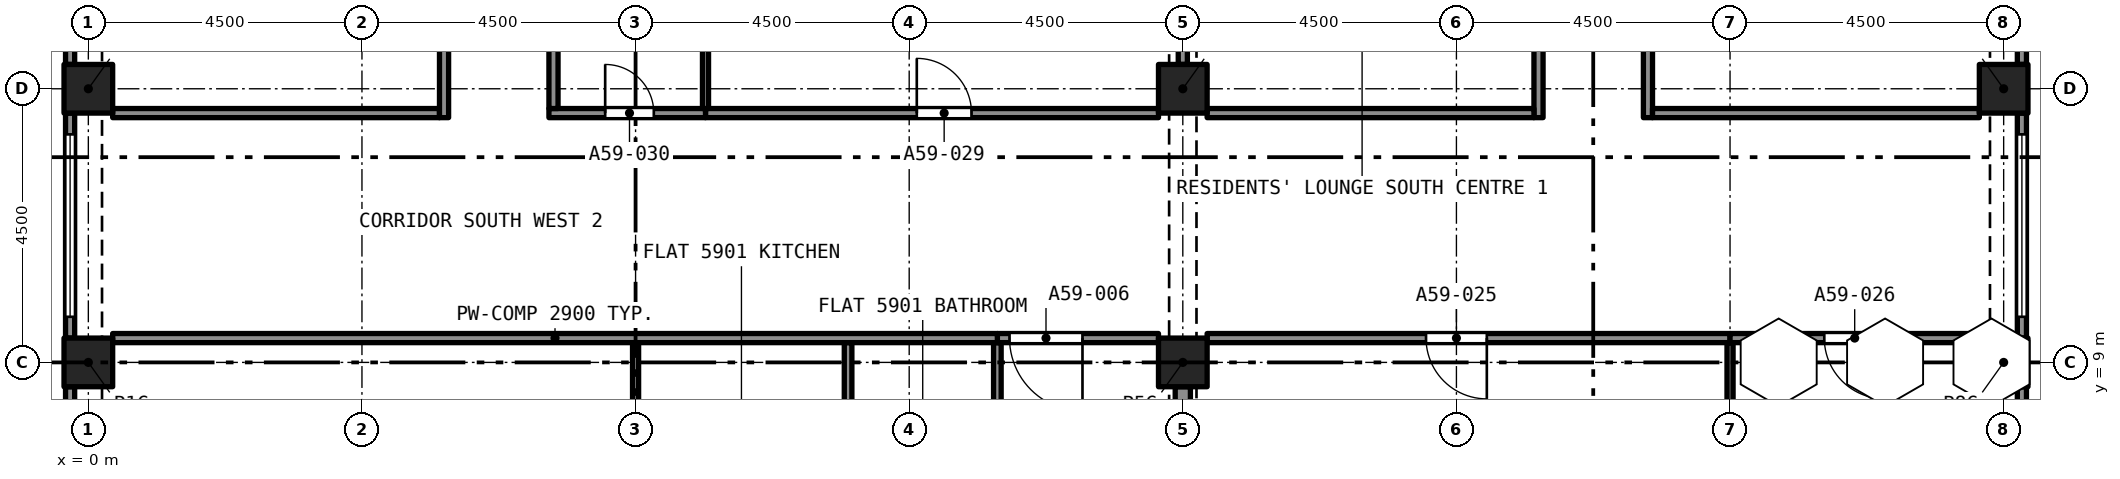
"""IFC4 building model, lengths in metres.
Left out: names, types, materials, properties, quantities, classifications, styles, units other than length and angle.
Written with IfcOpenShell. Run it as: python <this file> out.ifc"""

import sys

from ifc_helpers import new_model, si_unit, direction, frame, frame_2d, origin, origin_2d, place, context, subcontext, project, spatial, rectangle, extrude, element, fill, save


model = new_model("IFC4")
c1 = context("Model", 3, precision=1e-05, world=origin(), true_north=direction((0.0, 1.0)))
c2 = subcontext(c1, "Body", "Model", "MODEL_VIEW")
j1 = project(units=[si_unit("LENGTHUNIT", "METRE"), si_unit("PLANEANGLEUNIT", "RADIAN")], contexts=[c1])
p1 = place(None, origin())
s1 = spatial("IfcSite", under=j1, at=p1, CompositionType="ELEMENT")
p2 = place(p1, origin())
s2 = spatial("IfcBuilding", under=s1, at=p2, CompositionType="ELEMENT")
p3 = place(p2, frame((0.0, 0.0, 213.295)))
s3 = spatial("IfcBuildingStorey", under=s2, at=p3, CompositionType="ELEMENT", Elevation=213.295)
for number, where, z_axis, x_axis in (
    (1, (0.0, 9.0, 0.0), (0.0, 0.0, 1.0), (1.0, 0.0, 0.0)),
    (2, (18.0, 9.0, 0.0), (0.0, 0.0, 1.0), (1.0, 0.0, 0.0)),
    (3, (31.5, 9.0, 0.0), (0.0, 0.0, 1.0), (1.0, 0.0, 0.0)),
    (4, (0.0, 13.5, 0.0), (0.0, 0.0, 1.0), (1.0, 0.0, 0.0)),
    (5, (18.0, 13.5, 0.0), (0.0, 0.0, 1.0), (1.0, 0.0, 0.0)),
    (6, (31.5, 13.5, 0.0), (0.0, 0.0, 1.0), (1.0, 0.0, 0.0)),
):
    element("IfcColumn", number, at=place(p3, frame(where, z_axis=z_axis, x_axis=x_axis)), inside=s3, PredefinedType="COLUMN", context=c2, shape_type="SweptSolid", body=[
        extrude(rectangle(XDim=0.8, YDim=0.8, at=origin_2d()), origin(), (0.0, 0.0, 1.0), 3.2),
    ])
p4 = place(p3, frame((31.8, 8.6, 0.0), z_axis=(0.0, 0.0, 1.0), x_axis=(0.0, -1.0, 0.0)))
e7 = element("IfcWall", 7, at=p4, inside=s3, PredefinedType="SOLIDWALL", context=c2, shape_type="SweptSolid", body=[
    extrude(rectangle(XDim=3.7, YDim=0.15, at=frame_2d((1.85, 0.0))), origin(), (0.0, 0.0, 1.0), 3.2),
])
p5 = place(p4, frame((0.35, 0.0, 0.45)))
e8 = element("IfcOpeningElement", 8, at=p5, cuts=e7, PredefinedType="OPENING", context=c2, shape_type="SweptSolid", body=[
    extrude(rectangle(XDim=3.0, YDim=1.95, at=frame_2d((1.5, 0.975))), frame((0.0, 0.085, 0.0), z_axis=(0.0, -1.0, 0.0), x_axis=(1.0, 0.0, 0.0)), (0.0, 0.0, 1.0), 0.17),
])
p6 = place(p3, frame((31.8, 13.1, 0.0), z_axis=(0.0, 0.0, 1.0), x_axis=(0.0, -1.0, 0.0)))
e9 = element("IfcWall", 9, at=p6, inside=s3, PredefinedType="SOLIDWALL", context=c2, shape_type="SweptSolid", body=[
    extrude(rectangle(XDim=3.7, YDim=0.15, at=frame_2d((1.85, 0.0))), origin(), (0.0, 0.0, 1.0), 3.2),
])
p7 = place(p6, frame((0.35, 0.0, 0.45)))
e10 = element("IfcOpeningElement", 10, at=p7, cuts=e9, PredefinedType="OPENING", context=c2, shape_type="SweptSolid", body=[
    extrude(rectangle(XDim=3.0, YDim=1.95, at=frame_2d((1.5, 0.975))), frame((0.0, 0.085, 0.0), z_axis=(0.0, -1.0, 0.0), x_axis=(1.0, 0.0, 0.0)), (0.0, 0.0, 1.0), 0.17),
])
p8 = place(p3, frame((31.8, 17.6, 0.0), z_axis=(0.0, 0.0, 1.0), x_axis=(0.0, -1.0, 0.0)))
e11 = element("IfcWall", 11, at=p8, inside=s3, PredefinedType="SOLIDWALL", context=c2, shape_type="SweptSolid", body=[
    extrude(rectangle(XDim=3.7, YDim=0.15, at=frame_2d((1.85, 0.0))), origin(), (0.0, 0.0, 1.0), 3.2),
])
p9 = place(p8, frame((0.35, 0.0, 0.45)))
e12 = element("IfcOpeningElement", 12, at=p9, cuts=e11, PredefinedType="OPENING", context=c2, shape_type="SweptSolid", body=[
    extrude(rectangle(XDim=3.0, YDim=1.95, at=frame_2d((1.5, 0.975))), frame((0.0, 0.085, 0.0), z_axis=(0.0, -1.0, 0.0), x_axis=(1.0, 0.0, 0.0)), (0.0, 0.0, 1.0), 0.17),
])
p10 = place(p3, frame((-0.3, 13.9, 0.0), z_axis=(0.0, 0.0, 1.0), x_axis=(0.0, 1.0, 0.0)))
e13 = element("IfcWall", 13, at=p10, inside=s3, PredefinedType="SOLIDWALL", context=c2, shape_type="SweptSolid", body=[
    extrude(rectangle(XDim=3.7, YDim=0.15, at=frame_2d((1.85, 0.0))), origin(), (0.0, 0.0, 1.0), 3.2),
])
p11 = place(p10, frame((0.35, 0.0, 0.45)))
e14 = element("IfcOpeningElement", 14, at=p11, cuts=e13, PredefinedType="OPENING", context=c2, shape_type="SweptSolid", body=[
    extrude(rectangle(XDim=3.0, YDim=1.95, at=frame_2d((1.5, 0.975))), frame((0.0, 0.085, 0.0), z_axis=(0.0, -1.0, 0.0), x_axis=(1.0, 0.0, 0.0)), (0.0, 0.0, 1.0), 0.17),
])
p12 = place(p3, frame((-0.3, 9.4, 0.0), z_axis=(0.0, 0.0, 1.0), x_axis=(0.0, 1.0, 0.0)))
e15 = element("IfcWall", 15, at=p12, inside=s3, PredefinedType="SOLIDWALL", context=c2, shape_type="SweptSolid", body=[
    extrude(rectangle(XDim=3.7, YDim=0.15, at=frame_2d((1.85, 0.0))), origin(), (0.0, 0.0, 1.0), 3.2),
])
p13 = place(p12, frame((0.35, 0.0, 0.45)))
e16 = element("IfcOpeningElement", 16, at=p13, cuts=e15, PredefinedType="OPENING", context=c2, shape_type="SweptSolid", body=[
    extrude(rectangle(XDim=3.0, YDim=1.95, at=frame_2d((1.5, 0.975))), frame((0.0, 0.085, 0.0), z_axis=(0.0, -1.0, 0.0), x_axis=(1.0, 0.0, 0.0)), (0.0, 0.0, 1.0), 0.17),
])
p14 = place(p3, frame((-0.3, 4.9, 0.0), z_axis=(0.0, 0.0, 1.0), x_axis=(0.0, 1.0, 0.0)))
e17 = element("IfcWall", 17, at=p14, inside=s3, PredefinedType="SOLIDWALL", context=c2, shape_type="SweptSolid", body=[
    extrude(rectangle(XDim=3.7, YDim=0.15, at=frame_2d((1.85, 0.0))), origin(), (0.0, 0.0, 1.0), 3.2),
])
p15 = place(p14, frame((0.35, 0.0, 0.45)))
e18 = element("IfcOpeningElement", 18, at=p15, cuts=e17, PredefinedType="OPENING", context=c2, shape_type="SweptSolid", body=[
    extrude(rectangle(XDim=3.0, YDim=1.95, at=frame_2d((1.5, 0.975))), frame((0.0, 0.085, 0.0), z_axis=(0.0, -1.0, 0.0), x_axis=(1.0, 0.0, 0.0)), (0.0, 0.0, 1.0), 0.17),
])
for number, where, z_axis, x_axis in (
    (19, (14.95, 5.762, 0.0), (0.0, 0.0, 1.0), (0.0, 1.0, 0.0)),
    (20, (12.495, 5.762, 0.0), (0.0, 0.0, 1.0), (0.0, 1.0, 0.0)),
):
    element("IfcWall", number, at=place(p3, frame(where, z_axis=z_axis, x_axis=x_axis)), inside=s3, PredefinedType="PARTITIONING", context=c2, shape_type="SweptSolid", body=[
        extrude(rectangle(XDim=3.562, YDim=0.125, at=frame_2d((1.781, 0.0))), origin(), (0.0, 0.0, 1.0), 2.9),
    ])
p16 = place(p3, frame((18.0, 4.9, 0.0), z_axis=(0.0, 0.0, 1.0), x_axis=(0.0, 1.0, 0.0)))
e21 = element("IfcWall", 21, at=p16, inside=s3, PredefinedType="PARTITIONING", context=c2, shape_type="SweptSolid", body=[
    extrude(rectangle(XDim=3.7, YDim=0.25, at=frame_2d((1.85, 0.0))), origin(), (0.0, 0.0, 1.0), 2.38),
])
p17 = place(p3, frame((17.6, 9.4, 0.0), z_axis=(0.0, 0.0, 1.0), x_axis=(-1.0, 0.0, 0.0)))
e22 = element("IfcWall", 22, at=p17, inside=s3, PredefinedType="PARTITIONING", context=c2, shape_type="SweptSolid", body=[
    extrude(rectangle(XDim=2.65, YDim=0.15, at=frame_2d((1.325, 0.0))), origin(), (0.0, 0.0, 1.0), 2.9),
])
p18 = place(p17, frame((1.25, 0.0, 0.0)))
e23 = element("IfcOpeningElement", 23, at=p18, cuts=e22, PredefinedType="OPENING", context=c2, shape_type="SweptSolid", body=[
    extrude(rectangle(XDim=1.2, YDim=2.4, at=frame_2d((0.6, 1.2))), frame((0.0, 0.085, 0.0), z_axis=(0.0, -1.0, 0.0), x_axis=(1.0, 0.0, 0.0)), (0.0, 0.0, 1.0), 0.17),
])
p19 = place(p3, frame((9.0, 5.7, 0.0), z_axis=(0.0, 0.0, 1.0), x_axis=(0.0, 1.0, 0.0)))
e24 = element("IfcWall", 24, at=p19, inside=s3, PredefinedType="PARTITIONING", context=c2, shape_type="SweptSolid", body=[
    extrude(rectangle(XDim=3.625, YDim=0.1, at=frame_2d((1.812, 0.0))), origin(), (0.0, 0.0, 1.0), 2.9),
])
p20 = place(p3, frame((0.4, 9.4, 0.0), z_axis=(0.0, 0.0, 1.0), x_axis=(1.0, 0.0, 0.0)))
e25 = element("IfcWall", 25, at=p20, inside=s3, PredefinedType="PARTITIONING", context=c2, shape_type="SweptSolid", body=[
    extrude(rectangle(XDim=14.55, YDim=0.15, at=frame_2d((7.275, 0.0))), origin(), (0.0, 0.0, 1.0), 2.9),
])
p21 = place(p3, frame((27.0, 0.433, 0.0), z_axis=(0.0, 0.0, 1.0), x_axis=(0.0, 1.0, 0.0)))
e26 = element("IfcWall", 26, at=p21, inside=s3, PredefinedType="PARTITIONING", context=c2, shape_type="SweptSolid", body=[
    extrude(rectangle(XDim=8.892, YDim=0.1, at=frame_2d((4.446, 0.0))), origin(), (0.0, 0.0, 1.0), 2.75),
])
p22 = place(p3, frame((27.0, 9.4, 0.0), z_axis=(0.0, 0.0, 1.0), x_axis=(-1.0, 0.0, 0.0)))
e27 = element("IfcWall", 27, at=p22, inside=s3, PredefinedType="PARTITIONING", context=c2, shape_type="SweptSolid", body=[
    extrude(rectangle(XDim=8.6, YDim=0.15, at=frame_2d((4.3, 0.0))), origin(), (0.0, 0.0, 1.0), 2.75),
])
p23 = place(p22, frame((4.0, 0.0, 0.0)))
e28 = element("IfcOpeningElement", 28, at=p23, cuts=e27, PredefinedType="OPENING", context=c2, shape_type="SweptSolid", body=[
    extrude(rectangle(XDim=1.0, YDim=2.1, at=frame_2d((0.5, 1.05))), frame((0.0, 0.085, 0.0), z_axis=(0.0, -1.0, 0.0), x_axis=(1.0, 0.0, 0.0)), (0.0, 0.0, 1.0), 0.17),
])
p24 = place(p3, frame((31.1, 9.4, 0.0), z_axis=(0.0, 0.0, 1.0), x_axis=(-1.0, 0.0, 0.0)))
e29 = element("IfcWall", 29, at=p24, inside=s3, PredefinedType="PARTITIONING", context=c2, shape_type="SweptSolid", body=[
    extrude(rectangle(XDim=4.1, YDim=0.15, at=frame_2d((2.05, 0.0))), origin(), (0.0, 0.0, 1.0), 2.75),
])
p25 = place(p24, frame((1.55, 0.0, 0.0)))
e30 = element("IfcOpeningElement", 30, at=p25, cuts=e29, PredefinedType="OPENING", context=c2, shape_type="SweptSolid", body=[
    extrude(rectangle(XDim=1.0, YDim=2.1, at=frame_2d((0.5, 1.05))), frame((0.0, 0.085, 0.0), z_axis=(0.0, -1.0, 0.0), x_axis=(1.0, 0.0, 0.0)), (0.0, 0.0, 1.0), 0.17),
])
p26 = place(p3, frame((23.85, 13.025, 0.0), z_axis=(0.0, 0.0, 1.0), x_axis=(0.0, 1.0, 0.0)))
e31 = element("IfcWall", 31, at=p26, inside=s3, PredefinedType="PARTITIONING", context=c2, shape_type="SweptSolid", body=[
    extrude(rectangle(XDim=9.55, YDim=0.15, at=frame_2d((4.775, 0.0))), origin(), (0.0, 0.0, 1.0), 2.75),
])
p27 = place(p26, frame((4.275, 0.0, 0.0)))
e32 = element("IfcOpeningElement", 32, at=p27, cuts=e31, PredefinedType="OPENING", context=c2, shape_type="SweptSolid", body=[
    extrude(rectangle(XDim=1.0, YDim=2.1, at=frame_2d((0.5, 1.05))), frame((0.0, 0.085, 0.0), z_axis=(0.0, -1.0, 0.0), x_axis=(1.0, 0.0, 0.0)), (0.0, 0.0, 1.0), 0.17),
])
p28 = place(p3, frame((25.65, 22.575, 0.0), z_axis=(0.0, 0.0, 1.0), x_axis=(0.0, -1.0, 0.0)))
e33 = element("IfcWall", 33, at=p28, inside=s3, PredefinedType="PARTITIONING", context=c2, shape_type="SweptSolid", body=[
    extrude(rectangle(XDim=9.55, YDim=0.15, at=frame_2d((4.775, 0.0))), origin(), (0.0, 0.0, 1.0), 2.75),
])
p29 = place(p28, frame((4.275, 0.0, 0.0)))
e34 = element("IfcOpeningElement", 34, at=p29, cuts=e33, PredefinedType="OPENING", context=c2, shape_type="SweptSolid", body=[
    extrude(rectangle(XDim=1.0, YDim=2.1, at=frame_2d((0.5, 1.05))), frame((0.0, 0.085, 0.0), z_axis=(0.0, -1.0, 0.0), x_axis=(1.0, 0.0, 0.0)), (0.0, 0.0, 1.0), 0.17),
])
for number, where, z_axis, x_axis in (
    (35, (18.4, 13.1, 0.0), (0.0, 0.0, 1.0), (1.0, 0.0, 0.0)),
    (36, (25.725, 13.1, 0.0), (0.0, 0.0, 1.0), (1.0, 0.0, 0.0)),
):
    element("IfcWall", number, at=place(p3, frame(where, z_axis=z_axis, x_axis=x_axis)), inside=s3, PredefinedType="PARTITIONING", context=c2, shape_type="SweptSolid", body=[
        extrude(rectangle(XDim=5.375, YDim=0.15, at=frame_2d((2.688, 0.0))), origin(), (0.0, 0.0, 1.0), 2.75),
    ])
p30 = place(p3, frame((10.15, 13.1, 0.0), z_axis=(0.0, 0.0, 1.0), x_axis=(1.0, 0.0, 0.0)))
e37 = element("IfcWall", 37, at=p30, inside=s3, PredefinedType="PARTITIONING", context=c2, shape_type="SweptSolid", body=[
    extrude(rectangle(XDim=7.45, YDim=0.15, at=frame_2d((3.725, 0.0))), origin(), (0.0, 0.0, 1.0), 2.9),
])
p31 = place(p30, frame((3.475, 0.0, 0.0)))
e38 = element("IfcOpeningElement", 38, at=p31, cuts=e37, PredefinedType="OPENING", context=c2, shape_type="SweptSolid", body=[
    extrude(rectangle(XDim=0.9, YDim=2.1, at=frame_2d((0.45, 1.05))), frame((0.0, 0.085, 0.0), z_axis=(0.0, -1.0, 0.0), x_axis=(1.0, 0.0, 0.0)), (0.0, 0.0, 1.0), 0.17),
])
p32 = place(p3, frame((7.575, 13.1, 0.0), z_axis=(0.0, 0.0, 1.0), x_axis=(1.0, 0.0, 0.0)))
e39 = element("IfcWall", 39, at=p32, inside=s3, PredefinedType="PARTITIONING", context=c2, shape_type="SweptSolid", body=[
    extrude(rectangle(XDim=2.575, YDim=0.15, at=frame_2d((1.288, 0.0))), origin(), (0.0, 0.0, 1.0), 2.9),
])
p33 = place(p32, frame((0.925, 0.0, 0.0)))
e40 = element("IfcOpeningElement", 40, at=p33, cuts=e39, PredefinedType="OPENING", context=c2, shape_type="SweptSolid", body=[
    extrude(rectangle(XDim=0.8, YDim=2.1, at=frame_2d((0.4, 1.05))), frame((0.0, 0.085, 0.0), z_axis=(0.0, -1.0, 0.0), x_axis=(1.0, 0.0, 0.0)), (0.0, 0.0, 1.0), 0.17),
])
p34 = place(p3, frame((0.4, 13.1, 0.0), z_axis=(0.0, 0.0, 1.0), x_axis=(1.0, 0.0, 0.0)))
e41 = element("IfcWall", 41, at=p34, inside=s3, PredefinedType="PARTITIONING", context=c2, shape_type="SweptSolid", body=[
    extrude(rectangle(XDim=5.375, YDim=0.15, at=frame_2d((2.688, 0.0))), origin(), (0.0, 0.0, 1.0), 2.9),
])
p35 = place(p3, frame((18.0, 13.9, 0.0), z_axis=(0.0, 0.0, 1.0), x_axis=(0.0, 1.0, 0.0)))
e42 = element("IfcWall", 42, at=p35, inside=s3, PredefinedType="PARTITIONING", context=c2, shape_type="SweptSolid", body=[
    extrude(rectangle(XDim=3.4, YDim=0.15, at=frame_2d((1.7, 0.0))), origin(), (0.0, 0.0, 1.0), 2.38),
])
p36 = place(p3, frame((7.65, 13.175, 0.0), z_axis=(0.0, 0.0, 1.0), x_axis=(0.0, 1.0, 0.0)))
e43 = element("IfcWall", 43, at=p36, inside=s3, PredefinedType="PARTITIONING", context=c2, shape_type="SweptSolid", body=[
    extrude(rectangle(XDim=4.125, YDim=0.15, at=frame_2d((2.062, 0.0))), origin(), (0.0, 0.0, 1.0), 2.9),
])
p37 = place(p3, frame((5.85, 13.025, 0.0), z_axis=(0.0, 0.0, 1.0), x_axis=(0.0, 1.0, 0.0)))
e44 = element("IfcWall", 44, at=p37, inside=s3, PredefinedType="PARTITIONING", context=c2, shape_type="SweptSolid", body=[
    extrude(rectangle(XDim=9.475, YDim=0.15, at=frame_2d((4.738, 0.0))), origin(), (0.0, 0.0, 1.0), 2.9),
])
p38 = place(p37, frame((4.275, 0.0, 0.0)))
e45 = element("IfcOpeningElement", 45, at=p38, cuts=e44, PredefinedType="OPENING", context=c2, shape_type="SweptSolid", body=[
    extrude(rectangle(XDim=1.0, YDim=2.1, at=frame_2d((0.5, 1.05))), frame((0.0, 0.085, 0.0), z_axis=(0.0, -1.0, 0.0), x_axis=(1.0, 0.0, 0.0)), (0.0, 0.0, 1.0), 0.17),
])
p39 = place(p3, frame((10.15, 13.175, 0.0), z_axis=(0.0, 0.0, 1.0), x_axis=(0.0, 1.0, 0.0)))
e46 = element("IfcWall", 46, at=p39, inside=s3, PredefinedType="PARTITIONING", context=c2, shape_type="SweptSolid", body=[
    extrude(rectangle(XDim=4.05, YDim=0.1, at=frame_2d((2.025, 0.0))), origin(), (0.0, 0.0, 1.0), 2.9),
])
p40 = place(p7, origin())
e47 = element("IfcWindow", 47, at=p40, inside=s3, PartitioningType="SINGLE_PANEL", PredefinedType="WINDOW", context=c2, shape_type="SweptSolid", body=[
    extrude(rectangle(XDim=3.0, YDim=1.95, at=frame_2d((1.5, 0.975))), frame((0.0, 0.03, 0.0), z_axis=(0.0, -1.0, 0.0), x_axis=(1.0, 0.0, 0.0)), (0.0, 0.0, 1.0), 0.06),
])
fill(e10, e47)
p41 = place(p13, origin())
e48 = element("IfcWindow", 48, at=p41, inside=s3, PartitioningType="SINGLE_PANEL", PredefinedType="WINDOW", context=c2, shape_type="SweptSolid", body=[
    extrude(rectangle(XDim=3.0, YDim=1.95, at=frame_2d((1.5, 0.975))), frame((0.0, 0.03, 0.0), z_axis=(0.0, -1.0, 0.0), x_axis=(1.0, 0.0, 0.0)), (0.0, 0.0, 1.0), 0.06),
])
fill(e16, e48)
p42 = place(p18, origin())
e49 = element("IfcDoor", 49, at=p42, inside=s3, OperationType="SINGLE_SWING_RIGHT", PredefinedType="DOOR", context=c2, shape_type="SweptSolid", body=[
    extrude(rectangle(XDim=1.2, YDim=2.4, at=frame_2d((0.6, 1.2))), frame((0.0, 0.025, 0.0), z_axis=(0.0, -1.0, 0.0), x_axis=(1.0, 0.0, 0.0)), (0.0, 0.0, 1.0), 0.05),
])
fill(e23, e49)
p43 = place(p23, origin())
e50 = element("IfcDoor", 50, at=p43, inside=s3, OperationType="SINGLE_SWING_RIGHT", PredefinedType="DOOR", context=c2, shape_type="SweptSolid", body=[
    extrude(rectangle(XDim=1.0, YDim=2.1, at=frame_2d((0.5, 1.05))), frame((0.0, 0.025, 0.0), z_axis=(0.0, -1.0, 0.0), x_axis=(1.0, 0.0, 0.0)), (0.0, 0.0, 1.0), 0.05),
])
fill(e28, e50)
p44 = place(p25, origin())
e51 = element("IfcDoor", 51, at=p44, inside=s3, OperationType="SINGLE_SWING_RIGHT", PredefinedType="DOOR", context=c2, shape_type="SweptSolid", body=[
    extrude(rectangle(XDim=1.0, YDim=2.1, at=frame_2d((0.5, 1.05))), frame((0.0, 0.025, 0.0), z_axis=(0.0, -1.0, 0.0), x_axis=(1.0, 0.0, 0.0)), (0.0, 0.0, 1.0), 0.05),
])
fill(e30, e51)
p45 = place(p31, origin())
e52 = element("IfcDoor", 52, at=p45, inside=s3, OperationType="SINGLE_SWING_RIGHT", PredefinedType="DOOR", context=c2, shape_type="SweptSolid", body=[
    extrude(rectangle(XDim=0.9, YDim=2.1, at=frame_2d((0.45, 1.05))), frame((0.0, 0.025, 0.0), z_axis=(0.0, -1.0, 0.0), x_axis=(1.0, 0.0, 0.0)), (0.0, 0.0, 1.0), 0.05),
])
fill(e38, e52)
p46 = place(p33, origin())
e53 = element("IfcDoor", 53, at=p46, inside=s3, OperationType="SINGLE_SWING_RIGHT", PredefinedType="DOOR", context=c2, shape_type="SweptSolid", body=[
    extrude(rectangle(XDim=0.8, YDim=2.1, at=frame_2d((0.4, 1.05))), frame((0.0, 0.025, 0.0), z_axis=(0.0, -1.0, 0.0), x_axis=(1.0, 0.0, 0.0)), (0.0, 0.0, 1.0), 0.05),
])
fill(e40, e53)
save(model, sys.argv[1])
